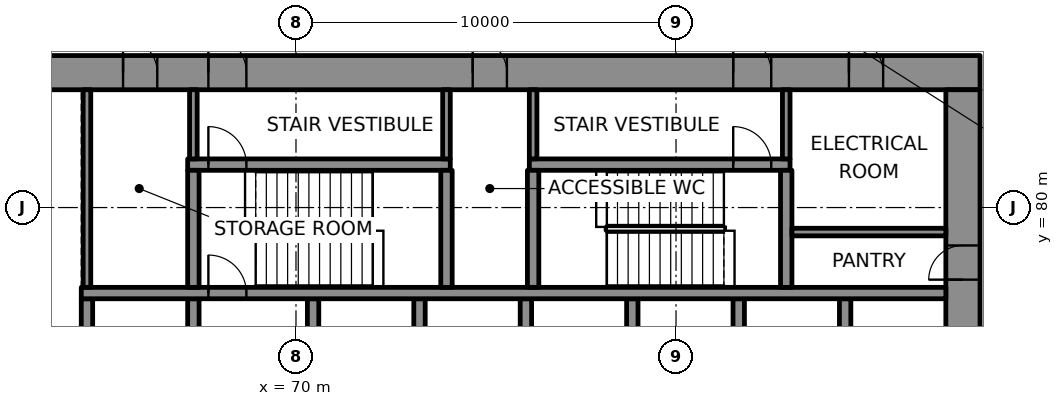
"""IFC4 building model, lengths in metres.
Left out: names, types, materials, properties, quantities, classifications, styles, units other than length and angle.
Written with IfcOpenShell. Run it as: python <this file> out.ifc"""

import sys

from ifc_helpers import new_model, si_unit, direction, frame, frame_2d, origin, place, context, subcontext, project, spatial, rectangle, extrude, element, fill, save


model = new_model("IFC4")
c1 = context("Model", 3, precision=1e-05, world=origin(), true_north=direction((0.0, 1.0)))
c2 = subcontext(c1, "Body", "Model", "MODEL_VIEW")
j1 = project(units=[si_unit("LENGTHUNIT", "METRE"), si_unit("PLANEANGLEUNIT", "RADIAN")], contexts=[c1])
p1 = place(None, origin())
s1 = spatial("IfcSite", under=j1, at=p1, CompositionType="ELEMENT")
p2 = place(p1, origin())
s2 = spatial("IfcBuilding", under=s1, at=p2, CompositionType="ELEMENT")
p3 = place(p2, frame((0.0, 0.0, 69.4)))
s3 = spatial("IfcBuildingStorey", under=s2, at=p3, CompositionType="ELEMENT", Elevation=69.4)
p4 = place(p3, frame((62.0, 83.55, 0.0), z_axis=(0.0, 0.0, 1.0), x_axis=(1.0, 0.0, 0.0)))
e1 = element("IfcWall", 1, at=p4, inside=s3, PredefinedType="SHEAR", context=c2, shape_type="SweptSolid", body=[
    extrude(rectangle(XDim=26.0, YDim=0.9, at=frame_2d((13.0, 0.0))), origin(), (0.0, 0.0, 1.0), 4.0),
])
p5 = place(p4, frame((5.695, 0.0, 0.0)))
e2 = element("IfcOpeningElement", 2, at=p5, cuts=e1, PredefinedType="OPENING", context=c2, shape_type="SweptSolid", body=[
    extrude(rectangle(XDim=1.0, YDim=2.1, at=frame_2d((0.5, 1.05))), frame((0.0, 0.46, 0.0), z_axis=(0.0, -1.0, 0.0), x_axis=(1.0, 0.0, 0.0)), (0.0, 0.0, 1.0), 0.92),
])
p6 = place(p4, frame((19.505, 0.0, 0.0)))
e3 = element("IfcOpeningElement", 3, at=p6, cuts=e1, PredefinedType="OPENING", context=c2, shape_type="SweptSolid", body=[
    extrude(rectangle(XDim=1.0, YDim=2.1, at=frame_2d((0.5, 1.05))), frame((0.0, 0.46, 0.0), z_axis=(0.0, -1.0, 0.0), x_axis=(1.0, 0.0, 0.0)), (0.0, 0.0, 1.0), 0.92),
])
p7 = place(p4, frame((3.45, 0.0, 0.0)))
e4 = element("IfcOpeningElement", 4, at=p7, cuts=e1, PredefinedType="OPENING", context=c2, shape_type="SweptSolid", body=[
    extrude(rectangle(XDim=0.9, YDim=2.1, at=frame_2d((0.45, 1.05))), frame((0.0, 0.46, 0.0), z_axis=(0.0, -1.0, 0.0), x_axis=(1.0, 0.0, 0.0)), (0.0, 0.0, 1.0), 0.92),
])
p8 = place(p4, frame((12.65, 0.0, 0.0)))
e5 = element("IfcOpeningElement", 5, at=p8, cuts=e1, PredefinedType="OPENING", context=c2, shape_type="SweptSolid", body=[
    extrude(rectangle(XDim=0.9, YDim=2.1, at=frame_2d((0.45, 1.05))), frame((0.0, 0.46, 0.0), z_axis=(0.0, -1.0, 0.0), x_axis=(1.0, 0.0, 0.0)), (0.0, 0.0, 1.0), 0.92),
])
p9 = place(p4, frame((22.55, 0.0, 0.0)))
e6 = element("IfcOpeningElement", 6, at=p9, cuts=e1, PredefinedType="OPENING", context=c2, shape_type="SweptSolid", body=[
    extrude(rectangle(XDim=0.9, YDim=2.1, at=frame_2d((0.45, 1.05))), frame((0.0, 0.46, 0.0), z_axis=(0.0, -1.0, 0.0), x_axis=(1.0, 0.0, 0.0)), (0.0, 0.0, 1.0), 0.92),
])
p10 = place(p3, frame((87.55, 66.9, 0.0), z_axis=(0.0, 0.0, 1.0), x_axis=(0.0, 1.0, 0.0)))
e7 = element("IfcWall", 7, at=p10, inside=s3, PredefinedType="SHEAR", context=c2, shape_type="SweptSolid", body=[
    extrude(rectangle(XDim=16.2, YDim=0.9, at=frame_2d((8.1, 0.0))), origin(), (0.0, 0.0, 1.0), 4.0),
])
p11 = place(p10, frame((5.5, 0.0, 0.0)))
e8 = element("IfcOpeningElement", 8, at=p11, cuts=e7, PredefinedType="OPENING", context=c2, shape_type="SweptSolid", body=[
    extrude(rectangle(XDim=1.8, YDim=2.1, at=frame_2d((0.9, 1.05))), frame((0.0, 0.46, 0.0), z_axis=(0.0, -1.0, 0.0), x_axis=(1.0, 0.0, 0.0)), (0.0, 0.0, 1.0), 0.92),
])
p12 = place(p10, frame((11.202, 0.0, 0.0)))
e9 = element("IfcOpeningElement", 9, at=p12, cuts=e7, PredefinedType="OPENING", context=c2, shape_type="SweptSolid", body=[
    extrude(rectangle(XDim=0.9, YDim=2.1, at=frame_2d((0.45, 1.05))), frame((0.0, 0.46, 0.0), z_axis=(0.0, -1.0, 0.0), x_axis=(1.0, 0.0, 0.0)), (0.0, 0.0, 1.0), 0.92),
])
for number, where, z_axis, x_axis in (
    (10, (64.5, 75.0, 0.0), (0.0, 0.0, 1.0), (0.0, 1.0, 0.0)),
    (11, (67.3, 75.0, 0.0), (0.0, 0.0, 1.0), (0.0, 1.0, 0.0)),
):
    element("IfcWall", number, at=place(p3, frame(where, z_axis=z_axis, x_axis=x_axis)), inside=s3, PredefinedType="SHEAR", context=c2, shape_type="SweptSolid", body=[
        extrude(rectangle(XDim=2.6, YDim=0.3, at=frame_2d((1.3, 0.0))), origin(), (0.0, 0.0, 1.0), 4.0),
    ])
p13 = place(p3, frame((70.45, 75.0, 0.0), z_axis=(0.0, 0.0, 1.0), x_axis=(0.0, 1.0, 0.0)))
e12 = element("IfcWall", 12, at=p13, inside=s3, PredefinedType="SHEAR", context=c2, shape_type="SweptSolid", body=[
    extrude(rectangle(XDim=2.6, YDim=0.3, at=frame_2d((1.3, 0.0))), origin(), (0.0, 0.0, 1.0), 4.0),
])
p14 = place(p13, frame((0.15, 0.0, 0.0)))
e13 = element("IfcOpeningElement", 13, at=p14, cuts=e12, PredefinedType="OPENING", context=c2, shape_type="SweptSolid", body=[
    extrude(rectangle(XDim=1.1, YDim=2.1, at=frame_2d((0.55, 1.05))), frame((0.0, 0.16, 0.0), z_axis=(0.0, -1.0, 0.0), x_axis=(1.0, 0.0, 0.0)), (0.0, 0.0, 1.0), 0.32),
])
for number, where, z_axis, x_axis in (
    (14, (73.25, 75.0, 0.0), (0.0, 0.0, 1.0), (0.0, 1.0, 0.0)),
    (15, (76.05, 75.0, 0.0), (0.0, 0.0, 1.0), (0.0, 1.0, 0.0)),
    (16, (78.85, 75.0, 0.0), (0.0, 0.0, 1.0), (0.0, 1.0, 0.0)),
    (17, (81.65, 75.0, 0.0), (0.0, 0.0, 1.0), (0.0, 1.0, 0.0)),
    (18, (84.45, 75.0, 0.0), (0.0, 0.0, 1.0), (0.0, 1.0, 0.0)),
):
    element("IfcWall", number, at=place(p3, frame(where, z_axis=z_axis, x_axis=x_axis)), inside=s3, PredefinedType="SHEAR", context=c2, shape_type="SweptSolid", body=[
        extrude(rectangle(XDim=2.6, YDim=0.3, at=frame_2d((1.3, 0.0))), origin(), (0.0, 0.0, 1.0), 4.0),
    ])
p15 = place(p3, frame((64.35, 77.75, 0.0), z_axis=(0.0, 0.0, 1.0), x_axis=(1.0, 0.0, 0.0)))
e19 = element("IfcWall", 19, at=p15, inside=s3, PredefinedType="SHEAR", context=c2, shape_type="SweptSolid", body=[
    extrude(rectangle(XDim=22.75, YDim=0.3, at=frame_2d((11.375, 0.0))), origin(), (0.0, 0.0, 1.0), 4.0),
])
p16 = place(p15, frame((3.345, 0.0, 0.0)))
e20 = element("IfcOpeningElement", 20, at=p16, cuts=e19, PredefinedType="OPENING", context=c2, shape_type="SweptSolid", body=[
    extrude(rectangle(XDim=1.0, YDim=2.1, at=frame_2d((0.5, 1.05))), frame((0.0, 0.16, 0.0), z_axis=(0.0, -1.0, 0.0), x_axis=(1.0, 0.0, 0.0)), (0.0, 0.0, 1.0), 0.32),
])
p17 = place(p3, frame((67.15, 81.13, 0.0), z_axis=(0.0, 0.0, 1.0), x_axis=(1.0, 0.0, 0.0)))
e21 = element("IfcWall", 21, at=p17, inside=s3, PredefinedType="SHEAR", context=c2, shape_type="SweptSolid", body=[
    extrude(rectangle(XDim=6.91, YDim=0.3, at=frame_2d((3.455, 0.0))), origin(), (0.0, 0.0, 1.0), 4.0),
])
p18 = place(p17, frame((0.545, 0.0, 0.0)))
e22 = element("IfcOpeningElement", 22, at=p18, cuts=e21, PredefinedType="OPENING", context=c2, shape_type="SweptSolid", body=[
    extrude(rectangle(XDim=1.0, YDim=2.1, at=frame_2d((0.5, 1.05))), frame((0.0, 0.16, 0.0), z_axis=(0.0, -1.0, 0.0), x_axis=(1.0, 0.0, 0.0)), (0.0, 0.0, 1.0), 0.32),
])
p19 = place(p3, frame((76.14, 81.13, 0.0), z_axis=(0.0, 0.0, 1.0), x_axis=(1.0, 0.0, 0.0)))
e23 = element("IfcWall", 23, at=p19, inside=s3, PredefinedType="SHEAR", context=c2, shape_type="SweptSolid", body=[
    extrude(rectangle(XDim=6.86, YDim=0.3, at=frame_2d((3.43, 0.0))), origin(), (0.0, 0.0, 1.0), 4.0),
])
p20 = place(p19, frame((5.365, 0.0, 0.0)))
e24 = element("IfcOpeningElement", 24, at=p20, cuts=e23, PredefinedType="OPENING", context=c2, shape_type="SweptSolid", body=[
    extrude(rectangle(XDim=1.0, YDim=2.1, at=frame_2d((0.5, 1.05))), frame((0.0, 0.16, 0.0), z_axis=(0.0, -1.0, 0.0), x_axis=(1.0, 0.0, 0.0)), (0.0, 0.0, 1.0), 0.32),
])
for number, where, z_axis, x_axis in (
    (25, (67.3, 77.9, 0.0), (0.0, 0.0, 1.0), (0.0, 1.0, 0.0)),
    (26, (73.96, 77.9, 0.0), (0.0, 0.0, 1.0), (0.0, 1.0, 0.0)),
    (27, (76.24, 77.9, 0.0), (0.0, 0.0, 1.0), (0.0, 1.0, 0.0)),
    (28, (82.9, 77.9, 0.0), (0.0, 0.0, 1.0), (0.0, 1.0, 0.0)),
):
    element("IfcWall", number, at=place(p3, frame(where, z_axis=z_axis, x_axis=x_axis)), inside=s3, PredefinedType="SHEAR", context=c2, shape_type="SweptSolid", body=[
        extrude(rectangle(XDim=3.08, YDim=0.3, at=frame_2d((1.54, 0.0))), origin(), (0.0, 0.0, 1.0), 4.0),
    ])
p21 = place(p3, frame((83.05, 79.355, 0.0), z_axis=(0.0, 0.0, 1.0), x_axis=(1.0, 0.0, 0.0)))
e29 = element("IfcWall", 29, at=p21, inside=s3, PredefinedType="PARTITIONING", context=c2, shape_type="SweptSolid", body=[
    extrude(rectangle(XDim=4.05, YDim=0.2, at=frame_2d((2.025, 0.0))), origin(), (0.0, 0.0, 1.0), 4.0),
])
p22 = place(p3, frame((64.5, 77.9, 0.0), z_axis=(0.0, 0.0, 1.0), x_axis=(0.0, 1.0, 0.0)))
e30 = element("IfcWall", 30, at=p22, inside=s3, PredefinedType="PARTITIONING", context=c2, shape_type="SweptSolid", body=[
    extrude(rectangle(XDim=5.2, YDim=0.2, at=frame_2d((2.6, 0.0))), origin(), (0.0, 0.0, 1.0), 4.0),
])
for number, where, z_axis, x_axis in (
    (31, (67.3, 81.28, 0.0), (0.0, 0.0, 1.0), (0.0, 1.0, 0.0)),
    (32, (73.96, 81.28, 0.0), (0.0, 0.0, 1.0), (0.0, 1.0, 0.0)),
    (33, (76.24, 81.28, 0.0), (0.0, 0.0, 1.0), (0.0, 1.0, 0.0)),
    (34, (82.9, 81.28, 0.0), (0.0, 0.0, 1.0), (0.0, 1.0, 0.0)),
):
    element("IfcWall", number, at=place(p3, frame(where, z_axis=z_axis, x_axis=x_axis)), inside=s3, PredefinedType="PARTITIONING", context=c2, shape_type="SweptSolid", body=[
        extrude(rectangle(XDim=1.82, YDim=0.2, at=frame_2d((0.91, 0.0))), origin(), (0.0, 0.0, 1.0), 4.0),
    ])
p23 = place(p16, origin())
e35 = element("IfcDoor", 35, at=p23, inside=s3, OperationType="SINGLE_SWING_LEFT", PredefinedType="DOOR", context=c2, shape_type="SweptSolid", body=[
    extrude(rectangle(XDim=1.0, YDim=2.1, at=frame_2d((0.5, 1.05))), frame((0.0, 0.025, 0.0), z_axis=(0.0, -1.0, 0.0), x_axis=(1.0, 0.0, 0.0)), (0.0, 0.0, 1.0), 0.05),
])
fill(e20, e35)
p24 = place(p18, origin())
e36 = element("IfcDoor", 36, at=p24, inside=s3, OperationType="SINGLE_SWING_RIGHT", PredefinedType="DOOR", context=c2, shape_type="SweptSolid", body=[
    extrude(rectangle(XDim=1.0, YDim=2.1, at=frame_2d((0.5, 1.05))), frame((0.0, 0.025, 0.0), z_axis=(0.0, -1.0, 0.0), x_axis=(1.0, 0.0, 0.0)), (0.0, 0.0, 1.0), 0.05),
])
fill(e22, e36)
p25 = place(p5, origin())
e37 = element("IfcDoor", 37, at=p25, inside=s3, OperationType="SINGLE_SWING_LEFT", PredefinedType="DOOR", context=c2, shape_type="SweptSolid", body=[
    extrude(rectangle(XDim=1.0, YDim=2.1, at=frame_2d((0.5, 1.05))), frame((0.0, 0.17, 0.0), z_axis=(0.0, -1.0, 0.0), x_axis=(1.0, 0.0, 0.0)), (0.0, 0.0, 1.0), 0.34),
])
fill(e2, e37)
p26 = place(p20, origin())
e38 = element("IfcDoor", 38, at=p26, inside=s3, OperationType="SINGLE_SWING_RIGHT", PredefinedType="DOOR", context=c2, shape_type="SweptSolid", body=[
    extrude(rectangle(XDim=1.0, YDim=2.1, at=frame_2d((0.5, 1.05))), frame((0.0, 0.025, 0.0), z_axis=(0.0, -1.0, 0.0), x_axis=(1.0, 0.0, 0.0)), (0.0, 0.0, 1.0), 0.05),
])
fill(e24, e38)
p27 = place(p6, origin())
e39 = element("IfcDoor", 39, at=p27, inside=s3, OperationType="SINGLE_SWING_LEFT", PredefinedType="DOOR", context=c2, shape_type="SweptSolid", body=[
    extrude(rectangle(XDim=1.0, YDim=2.1, at=frame_2d((0.5, 1.05))), frame((0.0, 0.17, 0.0), z_axis=(0.0, -1.0, 0.0), x_axis=(1.0, 0.0, 0.0)), (0.0, 0.0, 1.0), 0.34),
])
fill(e3, e39)
p28 = place(p7, origin())
e40 = element("IfcDoor", 40, at=p28, inside=s3, OperationType="SINGLE_SWING_RIGHT", PredefinedType="DOOR", context=c2, shape_type="SweptSolid", body=[
    extrude(rectangle(XDim=0.9, YDim=2.1, at=frame_2d((0.45, 1.05))), frame((0.0, 0.17, 0.0), z_axis=(0.0, -1.0, 0.0), x_axis=(1.0, 0.0, 0.0)), (0.0, 0.0, 1.0), 0.34),
])
fill(e4, e40)
p29 = place(p8, origin())
e41 = element("IfcDoor", 41, at=p29, inside=s3, OperationType="SINGLE_SWING_LEFT", PredefinedType="DOOR", context=c2, shape_type="SweptSolid", body=[
    extrude(rectangle(XDim=0.9, YDim=2.1, at=frame_2d((0.45, 1.05))), frame((0.0, 0.17, 0.0), z_axis=(0.0, -1.0, 0.0), x_axis=(1.0, 0.0, 0.0)), (0.0, 0.0, 1.0), 0.34),
])
fill(e5, e41)
p30 = place(p12, origin())
e42 = element("IfcDoor", 42, at=p30, inside=s3, OperationType="SINGLE_SWING_RIGHT", PredefinedType="DOOR", context=c2, shape_type="SweptSolid", body=[
    extrude(rectangle(XDim=0.9, YDim=2.1, at=frame_2d((0.45, 1.05))), frame((0.0, 0.17, 0.0), z_axis=(0.0, -1.0, 0.0), x_axis=(1.0, 0.0, 0.0)), (0.0, 0.0, 1.0), 0.34),
])
fill(e9, e42)
p31 = place(p9, origin())
e43 = element("IfcDoor", 43, at=p31, inside=s3, OperationType="SINGLE_SWING_LEFT", PredefinedType="DOOR", context=c2, shape_type="SweptSolid", body=[
    extrude(rectangle(XDim=0.9, YDim=2.1, at=frame_2d((0.45, 1.05))), frame((0.0, 0.17, 0.0), z_axis=(0.0, -1.0, 0.0), x_axis=(1.0, 0.0, 0.0)), (0.0, 0.0, 1.0), 0.34),
])
fill(e6, e43)
save(model, sys.argv[1])
